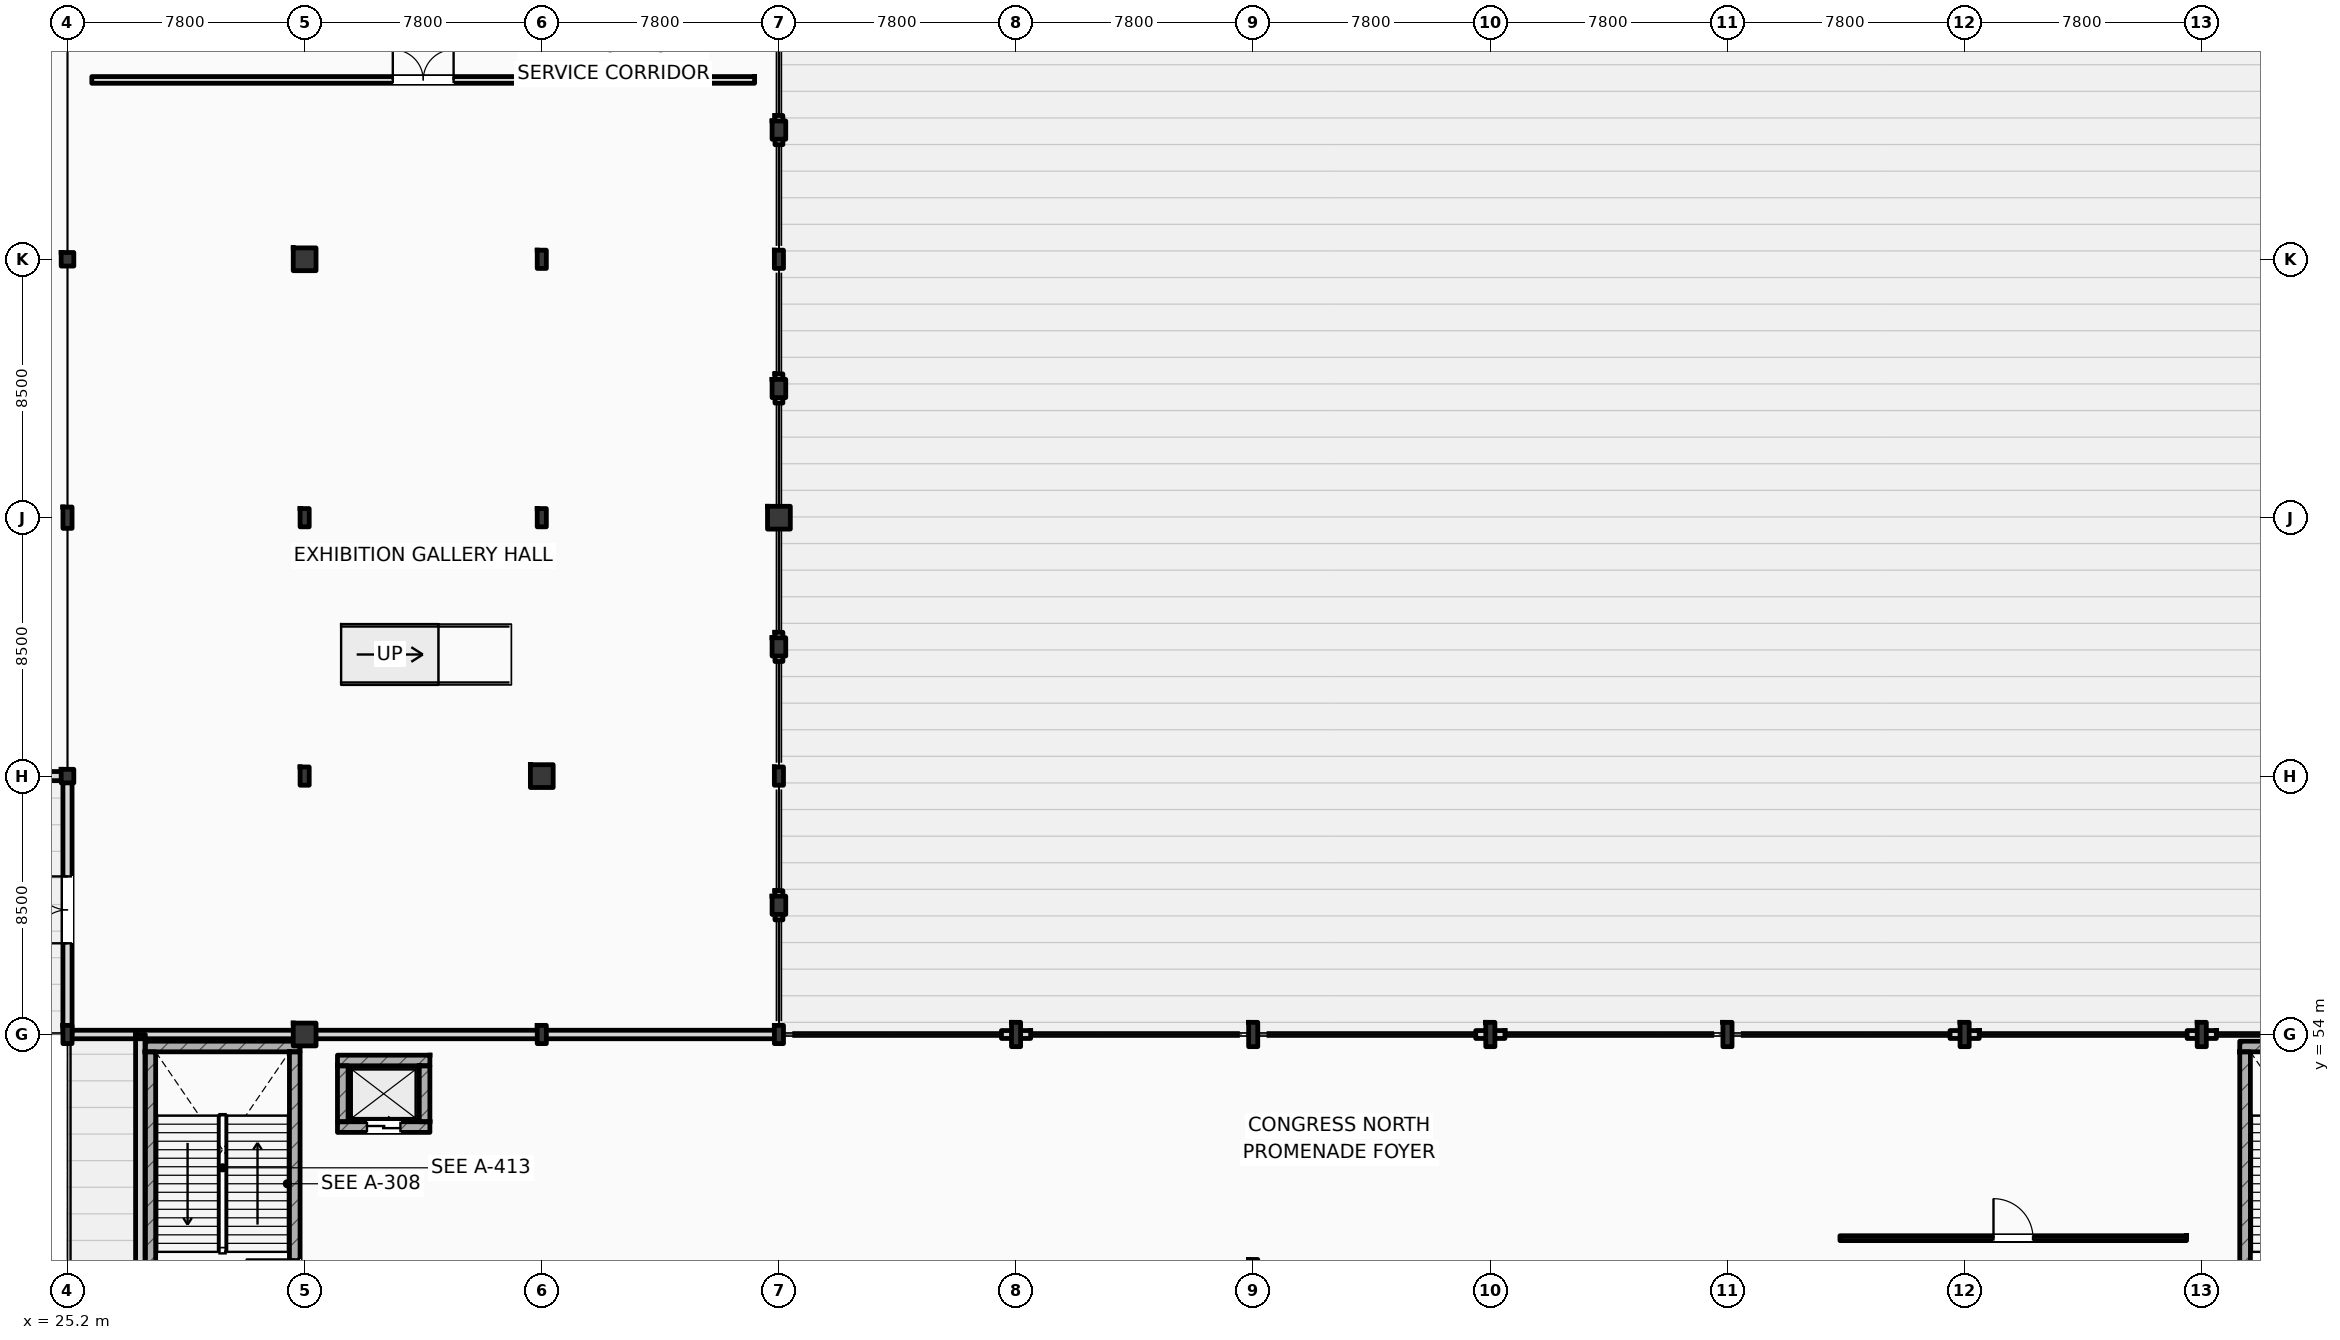
"""IFC4 building model, lengths in metres.
Left out: names, types, materials, properties, quantities, classifications, styles, units other than length and angle.
Written with IfcOpenShell. Run it as: python <this file> out.ifc"""

import sys

from ifc_helpers import new_model, si_unit, direction, frame, frame_2d, origin, origin_2d, place, context, subcontext, project, spatial, rectangle, i_section, extrude, element, fill, save


model = new_model("IFC4")
c1 = context("Model", 3, precision=1e-05, world=origin(), true_north=direction((0.0, 1.0)))
c2 = subcontext(c1, "Body", "Model", "MODEL_VIEW")
j1 = project(units=[si_unit("LENGTHUNIT", "METRE"), si_unit("PLANEANGLEUNIT", "RADIAN")], contexts=[c1])
p1 = place(None, origin())
s1 = spatial("IfcSite", under=j1, at=p1, CompositionType="ELEMENT")
p2 = place(p1, origin())
s2 = spatial("IfcBuilding", under=s1, at=p2, CompositionType="ELEMENT")
p3 = place(p2, origin())
s3 = spatial("IfcBuildingStorey", under=s2, at=p3, CompositionType="ELEMENT", Elevation=0.0)
p4 = place(p3, frame((25.2, 62.5, 0.0), z_axis=(0.0, 0.0, 1.0), x_axis=(1.0, 0.0, 0.0)))
e1 = element("IfcColumn", 1, at=p4, inside=s3, PredefinedType="COLUMN", context=c2, shape_type="SweptSolid", body=[
    extrude(i_section(OverallWidth=0.416, OverallDepth=0.446, WebThickness=0.036, FlangeThickness=0.048, FilletRadius=0.015, at=origin_2d()), origin(), (0.0, 0.0, 1.0), 6.0),
])
p5 = place(p3, frame((25.2, 71.0, 0.0), z_axis=(0.0, 0.0, 1.0), x_axis=(1.0, 0.0, 0.0)))
e2 = element("IfcColumn", 2, at=p5, inside=s3, PredefinedType="COLUMN", context=c2, shape_type="SweptSolid", body=[
    extrude(i_section(OverallWidth=0.3, OverallDepth=0.7, WebThickness=0.017, FlangeThickness=0.032, FilletRadius=0.027, at=origin_2d()), origin(), (0.0, 0.0, 1.0), 6.0),
])
p6 = place(p3, frame((25.2, 79.5, 0.0), z_axis=(0.0, 0.0, 1.0), x_axis=(1.0, 0.0, 0.0)))
e3 = element("IfcColumn", 3, at=p6, inside=s3, PredefinedType="COLUMN", context=c2, shape_type="SweptSolid", body=[
    extrude(i_section(OverallWidth=0.416, OverallDepth=0.446, WebThickness=0.036, FlangeThickness=0.048, FilletRadius=0.015, at=origin_2d()), origin(), (0.0, 0.0, 1.0), 6.0),
])
p7 = place(p3, frame((25.2, 54.0, 0.0), z_axis=(0.0, 0.0, 1.0), x_axis=(1.0, 0.0, 0.0)))
e4 = element("IfcColumn", 4, at=p7, inside=s3, PredefinedType="COLUMN", context=c2, shape_type="SweptSolid", body=[
    extrude(i_section(OverallWidth=0.3, OverallDepth=0.6, WebThickness=0.015, FlangeThickness=0.03, FilletRadius=0.027, at=origin_2d()), origin(), (0.0, 0.0, 1.0), 6.0),
])
p8 = place(p3, frame((33.0, 54.0, 0.0), z_axis=(0.0, 0.0, 1.0), x_axis=(1.0, 0.0, 0.0)))
e5 = element("IfcColumn", 5, at=p8, inside=s3, PredefinedType="COLUMN", context=c2, shape_type="SweptSolid", body=[
    extrude(rectangle(XDim=0.75, YDim=0.75, at=origin_2d()), origin(), (0.0, 0.0, 1.0), 6.0),
])
for number, where, z_axis, x_axis in (
    (6, (33.0, 62.5, 0.0), (0.0, 0.0, 1.0), (1.0, 0.0, 0.0)),
    (7, (33.0, 71.0, 0.0), (0.0, 0.0, 1.0), (1.0, 0.0, 0.0)),
):
    element("IfcColumn", number, at=place(p3, frame(where, z_axis=z_axis, x_axis=x_axis)), inside=s3, PredefinedType="COLUMN", context=c2, shape_type="SweptSolid", body=[
        extrude(i_section(OverallWidth=0.3, OverallDepth=0.6, WebThickness=0.015, FlangeThickness=0.03, FilletRadius=0.027, at=origin_2d()), origin(), (0.0, 0.0, 1.0), 6.0),
    ])
p9 = place(p3, frame((33.0, 79.5, 0.0), z_axis=(0.0, 0.0, 1.0), x_axis=(1.0, 0.0, 0.0)))
e8 = element("IfcColumn", 8, at=p9, inside=s3, PredefinedType="COLUMN", context=c2, shape_type="SweptSolid", body=[
    extrude(rectangle(XDim=0.75, YDim=0.75, at=origin_2d()), origin(), (0.0, 0.0, 1.0), 6.0),
])
p10 = place(p3, frame((40.8, 54.0, 0.0), z_axis=(0.0, 0.0, 1.0), x_axis=(1.0, 0.0, 0.0)))
e9 = element("IfcColumn", 9, at=p10, inside=s3, PredefinedType="COLUMN", context=c2, shape_type="SweptSolid", body=[
    extrude(i_section(OverallWidth=0.3, OverallDepth=0.6, WebThickness=0.015, FlangeThickness=0.03, FilletRadius=0.027, at=origin_2d()), origin(), (0.0, 0.0, 1.0), 6.0),
])
p11 = place(p3, frame((40.8, 62.5, 0.0), z_axis=(0.0, 0.0, 1.0), x_axis=(1.0, 0.0, 0.0)))
e10 = element("IfcColumn", 10, at=p11, inside=s3, PredefinedType="COLUMN", context=c2, shape_type="SweptSolid", body=[
    extrude(rectangle(XDim=0.75, YDim=0.75, at=origin_2d()), origin(), (0.0, 0.0, 1.0), 6.0),
])
for number, where, z_axis, x_axis in (
    (11, (40.8, 71.0, 0.0), (0.0, 0.0, 1.0), (1.0, 0.0, 0.0)),
    (12, (40.8, 79.5, 0.0), (0.0, 0.0, 1.0), (1.0, 0.0, 0.0)),
    (13, (48.6, 54.0, 0.0), (0.0, 0.0, 1.0), (1.0, 0.0, 0.0)),
    (14, (48.6, 62.5, 0.0), (0.0, 0.0, 1.0), (1.0, 0.0, 0.0)),
):
    element("IfcColumn", number, at=place(p3, frame(where, z_axis=z_axis, x_axis=x_axis)), inside=s3, PredefinedType="COLUMN", context=c2, shape_type="SweptSolid", body=[
        extrude(i_section(OverallWidth=0.3, OverallDepth=0.6, WebThickness=0.015, FlangeThickness=0.03, FilletRadius=0.027, at=origin_2d()), origin(), (0.0, 0.0, 1.0), 6.0),
    ])
p12 = place(p3, frame((48.6, 71.0, 0.0), z_axis=(0.0, 0.0, 1.0), x_axis=(1.0, 0.0, 0.0)))
e15 = element("IfcColumn", 15, at=p12, inside=s3, PredefinedType="COLUMN", context=c2, shape_type="SweptSolid", body=[
    extrude(rectangle(XDim=0.75, YDim=0.75, at=origin_2d()), origin(), (0.0, 0.0, 1.0), 6.0),
])
p13 = place(p3, frame((48.6, 79.5, 0.0), z_axis=(0.0, 0.0, 1.0), x_axis=(1.0, 0.0, 0.0)))
e16 = element("IfcColumn", 16, at=p13, inside=s3, PredefinedType="COLUMN", context=c2, shape_type="SweptSolid", body=[
    extrude(i_section(OverallWidth=0.3, OverallDepth=0.6, WebThickness=0.015, FlangeThickness=0.03, FilletRadius=0.027, at=origin_2d()), origin(), (0.0, 0.0, 1.0), 6.0),
])
for number, where, z_axis, x_axis in (
    (17, (56.4, 54.0, 0.0), (0.0, 0.0, 1.0), (1.0, 0.0, 0.0)),
    (18, (64.2, 54.0, 0.0), (0.0, 0.0, 1.0), (1.0, 0.0, 0.0)),
    (19, (72.0, 54.0, 0.0), (0.0, 0.0, 1.0), (1.0, 0.0, 0.0)),
    (20, (79.8, 54.0, 0.0), (0.0, 0.0, 1.0), (1.0, 0.0, 0.0)),
    (21, (87.6, 54.0, 0.0), (0.0, 0.0, 1.0), (1.0, 0.0, 0.0)),
    (22, (95.4, 54.0, 0.0), (0.0, 0.0, 1.0), (1.0, 0.0, 0.0)),
    (23, (64.2, 46.2, 0.0), (0.0, 0.0, 1.0), (1.0, 0.0, 0.0)),
):
    element("IfcColumn", number, at=place(p3, frame(where, z_axis=z_axis, x_axis=x_axis)), inside=s3, PredefinedType="COLUMN", context=c2, shape_type="SweptSolid", body=[
        extrude(i_section(OverallWidth=0.3, OverallDepth=0.8, WebThickness=0.018, FlangeThickness=0.033, FilletRadius=0.03, at=origin_2d()), origin(), (0.0, 0.0, 1.0), 6.0),
    ])
for number, where, z_axis, x_axis in (
    (24, (48.6, 58.25, 0.0), (0.0, 0.0, 1.0), (1.0, 0.0, 0.0)),
    (25, (48.6, 66.75, 0.0), (0.0, 0.0, 1.0), (1.0, 0.0, 0.0)),
    (26, (48.6, 75.25, 0.0), (0.0, 0.0, 1.0), (1.0, 0.0, 0.0)),
    (27, (48.6, 83.75, 0.0), (0.0, 0.0, 1.0), (1.0, 0.0, 0.0)),
):
    element("IfcColumn", number, at=place(p3, frame(where, z_axis=z_axis, x_axis=x_axis)), inside=s3, PredefinedType="PILASTER", context=c2, shape_type="SweptSolid", body=[
        extrude(rectangle(XDim=0.45, YDim=0.6, at=origin_2d()), origin(), (0.0, 0.0, 1.0), 6.0),
    ])
p14 = place(p3, frame((27.75, 53.605, 0.0), z_axis=(0.0, 0.0, 1.0), x_axis=(1.0, 0.0, 0.0)))
e28 = element("IfcWall", 28, at=p14, inside=s3, PredefinedType="SHEAR", context=c2, shape_type="SweptSolid", body=[
    extrude(rectangle(XDim=5.1, YDim=0.35, at=frame_2d((2.55, 0.0))), origin(), (0.0, 0.0, 1.0), 6.0),
])
p15 = place(p3, frame((27.925, 44.75, 0.0), z_axis=(0.0, 0.0, 1.0), x_axis=(0.0, 1.0, 0.0)))
e29 = element("IfcWall", 29, at=p15, inside=s3, PredefinedType="SHEAR", context=c2, shape_type="SweptSolid", body=[
    extrude(rectangle(XDim=8.68, YDim=0.35, at=frame_2d((4.34, 0.0))), origin(), (0.0, 0.0, 1.0), 6.0),
])
p16 = place(p3, frame((32.675, 44.75, 0.0), z_axis=(0.0, 0.0, 1.0), x_axis=(0.0, 1.0, 0.0)))
e30 = element("IfcWall", 30, at=p16, inside=s3, PredefinedType="SHEAR", context=c2, shape_type="SweptSolid", body=[
    extrude(rectangle(XDim=8.68, YDim=0.35, at=frame_2d((4.34, 0.0))), origin(), (0.0, 0.0, 1.0), 6.0),
])
p17 = place(p16, frame((0.25, 0.0, 0.0)))
e31 = element("IfcOpeningElement", 31, at=p17, cuts=e30, PredefinedType="OPENING", context=c2, shape_type="SweptSolid", body=[
    extrude(rectangle(XDim=1.6, YDim=2.2, at=frame_2d((0.8, 1.1))), frame((0.0, 0.185, 0.0), z_axis=(0.0, -1.0, 0.0), x_axis=(1.0, 0.0, 0.0)), (0.0, 0.0, 1.0), 0.37),
])
p18 = place(p3, frame((96.65, 53.605, 0.0), z_axis=(0.0, 0.0, 1.0), x_axis=(1.0, 0.0, 0.0)))
e32 = element("IfcWall", 32, at=p18, inside=s3, PredefinedType="SHEAR", context=c2, shape_type="SweptSolid", body=[
    extrude(rectangle(XDim=5.1, YDim=0.35, at=frame_2d((2.55, 0.0))), origin(), (0.0, 0.0, 1.0), 6.0),
])
p19 = place(p3, frame((96.825, 44.75, 0.0), z_axis=(0.0, 0.0, 1.0), x_axis=(0.0, 1.0, 0.0)))
e33 = element("IfcWall", 33, at=p19, inside=s3, PredefinedType="SHEAR", context=c2, shape_type="SweptSolid", body=[
    extrude(rectangle(XDim=8.68, YDim=0.35, at=frame_2d((4.34, 0.0))), origin(), (0.0, 0.0, 1.0), 6.0),
])
p20 = place(p3, frame((27.6, 45.0, 0.0), z_axis=(0.0, 0.0, 1.0), x_axis=(0.0, 1.0, 0.0)))
e34 = element("IfcWall", 34, at=p20, inside=s3, PredefinedType="STANDARD", context=c2, shape_type="SweptSolid", body=[
    extrude(rectangle(XDim=9.0, YDim=0.32, at=frame_2d((4.5, 0.0))), origin(), (0.0, 0.0, 1.0), 5.7),
])
for number, where, z_axis, x_axis in (
    (35, (55.92, 54.0, 0.0), (0.0, 0.0, 1.0), (1.0, 0.0, 0.0)),
    (36, (71.52, 54.0, 0.0), (0.0, 0.0, 1.0), (1.0, 0.0, 0.0)),
    (37, (87.12, 54.0, 0.0), (0.0, 0.0, 1.0), (1.0, 0.0, 0.0)),
    (38, (94.92, 54.0, 0.0), (0.0, 0.0, 1.0), (1.0, 0.0, 0.0)),
):
    element("IfcWall", number, at=place(p3, frame(where, z_axis=z_axis, x_axis=x_axis)), inside=s3, PredefinedType="STANDARD", context=c2, shape_type="SweptSolid", body=[
        extrude(rectangle(XDim=0.96, YDim=0.26, at=frame_2d((0.48, 0.0))), origin(), (0.0, 0.0, 1.0), 5.19),
    ])
p21 = place(p3, frame((25.2, 54.0, 0.0), z_axis=(0.0, 0.0, 1.0), x_axis=(1.0, 0.0, 0.0)))
e39 = element("IfcWall", 39, at=p21, inside=s3, PredefinedType="STANDARD", context=c2, shape_type="SweptSolid", body=[
    extrude(rectangle(XDim=23.4, YDim=0.28, at=frame_2d((11.7, 0.0))), origin(), (0.0, 0.0, 1.0), 5.19),
])
for number, where, z_axis, x_axis in (
    (40, (48.6, 57.77, 0.0), (0.0, 0.0, 1.0), (0.0, 1.0, 0.0)),
    (41, (48.6, 66.27, 0.0), (0.0, 0.0, 1.0), (0.0, 1.0, 0.0)),
    (42, (48.6, 74.77, 0.0), (0.0, 0.0, 1.0), (0.0, 1.0, 0.0)),
    (43, (48.6, 83.27, 0.0), (0.0, 0.0, 1.0), (0.0, 1.0, 0.0)),
):
    element("IfcWall", number, at=place(p3, frame(where, z_axis=z_axis, x_axis=x_axis)), inside=s3, PredefinedType="STANDARD", context=c2, shape_type="SweptSolid", body=[
        extrude(rectangle(XDim=0.96, YDim=0.26, at=frame_2d((0.48, 0.0))), origin(), (0.0, 0.0, 1.0), 5.2),
    ])
p22 = place(p3, frame((0.0, 62.5, 0.0), z_axis=(0.0, 0.0, 1.0), x_axis=(1.0, 0.0, 0.0)))
e44 = element("IfcWall", 44, at=p22, inside=s3, PredefinedType="STANDARD", context=c2, shape_type="SweptSolid", body=[
    extrude(rectangle(XDim=25.2, YDim=0.3, at=frame_2d((12.6, 0.0))), origin(), (0.0, 0.0, 1.0), 5.14),
])
p23 = place(p22, frame((20.35, 0.0, 0.0)))
e45 = element("IfcOpeningElement", 45, at=p23, cuts=e44, PredefinedType="OPENING", context=c2, shape_type="SweptSolid", body=[
    extrude(rectangle(XDim=2.1, YDim=2.4, at=frame_2d((1.05, 1.2))), frame((0.0, 0.16, 0.0), z_axis=(0.0, -1.0, 0.0), x_axis=(1.0, 0.0, 0.0)), (0.0, 0.0, 1.0), 0.32),
])
p24 = place(p3, frame((25.2, 54.0, 0.0), z_axis=(0.0, 0.0, 1.0), x_axis=(0.0, 1.0, 0.0)))
e46 = element("IfcWall", 46, at=p24, inside=s3, PredefinedType="STANDARD", context=c2, shape_type="SweptSolid", body=[
    extrude(rectangle(XDim=8.5, YDim=0.3, at=frame_2d((4.25, 0.0))), origin(), (0.0, 0.0, 1.0), 5.2),
])
p25 = place(p24, frame((3.0, 0.0, 0.0)))
e47 = element("IfcOpeningElement", 47, at=p25, cuts=e46, PredefinedType="OPENING", context=c2, shape_type="SweptSolid", body=[
    extrude(rectangle(XDim=2.2, YDim=2.5, at=frame_2d((1.1, 1.25))), frame((0.0, 0.16, 0.0), z_axis=(0.0, -1.0, 0.0), x_axis=(1.0, 0.0, 0.0)), (0.0, 0.0, 1.0), 0.32),
])
p26 = place(p3, frame((34.08, 53.145, 0.0), z_axis=(0.0, 0.0, 1.0), x_axis=(1.0, 0.0, 0.0)))
e48 = element("IfcWall", 48, at=p26, inside=s3, PredefinedType="SHEAR", context=c2, shape_type="SweptSolid", body=[
    extrude(rectangle(XDim=3.04, YDim=0.35, at=frame_2d((1.52, 0.0))), origin(), (0.0, 0.0, 1.0), 5.7),
])
p27 = place(p3, frame((34.08, 50.955, 0.0), z_axis=(0.0, 0.0, 1.0), x_axis=(1.0, 0.0, 0.0)))
e49 = element("IfcWall", 49, at=p27, inside=s3, PredefinedType="SHEAR", context=c2, shape_type="SweptSolid", body=[
    extrude(rectangle(XDim=3.04, YDim=0.35, at=frame_2d((1.52, 0.0))), origin(), (0.0, 0.0, 1.0), 5.7),
])
p28 = place(p27, frame((0.97, 0.0, 0.0)))
e50 = element("IfcOpeningElement", 50, at=p28, cuts=e49, PredefinedType="OPENING", context=c2, shape_type="SweptSolid", body=[
    extrude(rectangle(XDim=1.1, YDim=2.2, at=frame_2d((0.55, 1.1))), frame((0.0, 0.185, 0.0), z_axis=(0.0, -1.0, 0.0), x_axis=(1.0, 0.0, 0.0)), (0.0, 0.0, 1.0), 0.37),
])
for number, where, z_axis, x_axis in (
    (51, (34.255, 51.13, 0.0), (0.0, 0.0, 1.0), (0.0, 1.0, 0.0)),
    (52, (36.945, 51.13, 0.0), (0.0, 0.0, 1.0), (0.0, 1.0, 0.0)),
):
    element("IfcWall", number, at=place(p3, frame(where, z_axis=z_axis, x_axis=x_axis)), inside=s3, PredefinedType="SHEAR", context=c2, shape_type="SweptSolid", body=[
        extrude(rectangle(XDim=1.84, YDim=0.35, at=frame_2d((0.92, 0.0))), origin(), (0.0, 0.0, 1.0), 5.7),
    ])
p29 = place(p3, frame((83.5, 47.3, 0.0), z_axis=(0.0, 0.0, 1.0), x_axis=(1.0, 0.0, 0.0)))
e53 = element("IfcWall", 53, at=p29, inside=s3, PredefinedType="PARTITIONING", context=c2, shape_type="SweptSolid", body=[
    extrude(rectangle(XDim=11.4, YDim=0.16, at=frame_2d((5.7, 0.0))), origin(), (0.0, 0.0, 1.0), 5.7),
])
p30 = place(p29, frame((5.05, 0.0, 0.0)))
e54 = element("IfcOpeningElement", 54, at=p30, cuts=e53, PredefinedType="OPENING", context=c2, shape_type="SweptSolid", body=[
    extrude(rectangle(XDim=1.3, YDim=2.2, at=frame_2d((0.65, 1.1))), frame((0.0, 0.09, 0.0), z_axis=(0.0, -1.0, 0.0), x_axis=(1.0, 0.0, 0.0)), (0.0, 0.0, 1.0), 0.18),
])
p31 = place(p3, frame((26.0, 85.4, 0.0), z_axis=(0.0, 0.0, 1.0), x_axis=(1.0, 0.0, 0.0)))
e55 = element("IfcWall", 55, at=p31, inside=s3, PredefinedType="PARTITIONING", context=c2, shape_type="SweptSolid", body=[
    extrude(rectangle(XDim=21.8, YDim=0.22, at=frame_2d((10.9, 0.0))), origin(), (0.0, 0.0, 1.0), 5.7),
])
p32 = place(p31, frame((9.9, 0.0, 0.0)))
e56 = element("IfcOpeningElement", 56, at=p32, cuts=e55, PredefinedType="OPENING", context=c2, shape_type="SweptSolid", body=[
    extrude(rectangle(XDim=2.0, YDim=2.35, at=frame_2d((1.0, 1.175))), frame((0.0, 0.12, 0.0), z_axis=(0.0, -1.0, 0.0), x_axis=(1.0, 0.0, 0.0)), (0.0, 0.0, 1.0), 0.24),
])
p33 = place(p25, origin())
e57 = element("IfcDoor", 57, at=p33, inside=s3, OperationType="DOUBLE_SWING_LEFT", PredefinedType="DOOR", context=c2, shape_type="SweptSolid", body=[
    extrude(rectangle(XDim=2.2, YDim=2.5, at=frame_2d((1.1, 1.25))), frame((0.0, 0.025, 0.0), z_axis=(0.0, -1.0, 0.0), x_axis=(1.0, 0.0, 0.0)), (0.0, 0.0, 1.0), 0.05),
])
fill(e47, e57)
p34 = place(p17, origin())
e58 = element("IfcDoor", 58, at=p34, inside=s3, OperationType="SINGLE_SWING_RIGHT", PredefinedType="DOOR", context=c2, shape_type="SweptSolid", body=[
    extrude(rectangle(XDim=1.6, YDim=2.2, at=frame_2d((0.8, 1.1))), frame((0.0, 0.025, 0.0), z_axis=(0.0, -1.0, 0.0), x_axis=(1.0, 0.0, 0.0)), (0.0, 0.0, 1.0), 0.05),
])
fill(e31, e58)
p35 = place(p28, origin())
e59 = element("IfcDoor", 59, at=p35, inside=s3, OperationType="SLIDING_TO_LEFT", PredefinedType="DOOR", context=c2, shape_type="SweptSolid", body=[
    extrude(rectangle(XDim=1.1, YDim=2.2, at=frame_2d((0.55, 1.1))), frame((0.0, 0.025, 0.0), z_axis=(0.0, -1.0, 0.0), x_axis=(1.0, 0.0, 0.0)), (0.0, 0.0, 1.0), 0.05),
])
fill(e50, e59)
p36 = place(p30, origin())
e60 = element("IfcDoor", 60, at=p36, inside=s3, OperationType="SINGLE_SWING_LEFT", PredefinedType="DOOR", context=c2, shape_type="SweptSolid", body=[
    extrude(rectangle(XDim=1.3, YDim=2.2, at=frame_2d((0.65, 1.1))), frame((0.0, 0.025, 0.0), z_axis=(0.0, -1.0, 0.0), x_axis=(1.0, 0.0, 0.0)), (0.0, 0.0, 1.0), 0.05),
])
fill(e54, e60)
p37 = place(p32, origin())
e61 = element("IfcDoor", 61, at=p37, inside=s3, OperationType="DOUBLE_SWING_LEFT", PredefinedType="DOOR", context=c2, shape_type="SweptSolid", body=[
    extrude(rectangle(XDim=2.0, YDim=2.35, at=frame_2d((1.0, 1.175))), frame((0.0, 0.025, 0.0), z_axis=(0.0, -1.0, 0.0), x_axis=(1.0, 0.0, 0.0)), (0.0, 0.0, 1.0), 0.05),
])
fill(e56, e61)
save(model, sys.argv[1])
